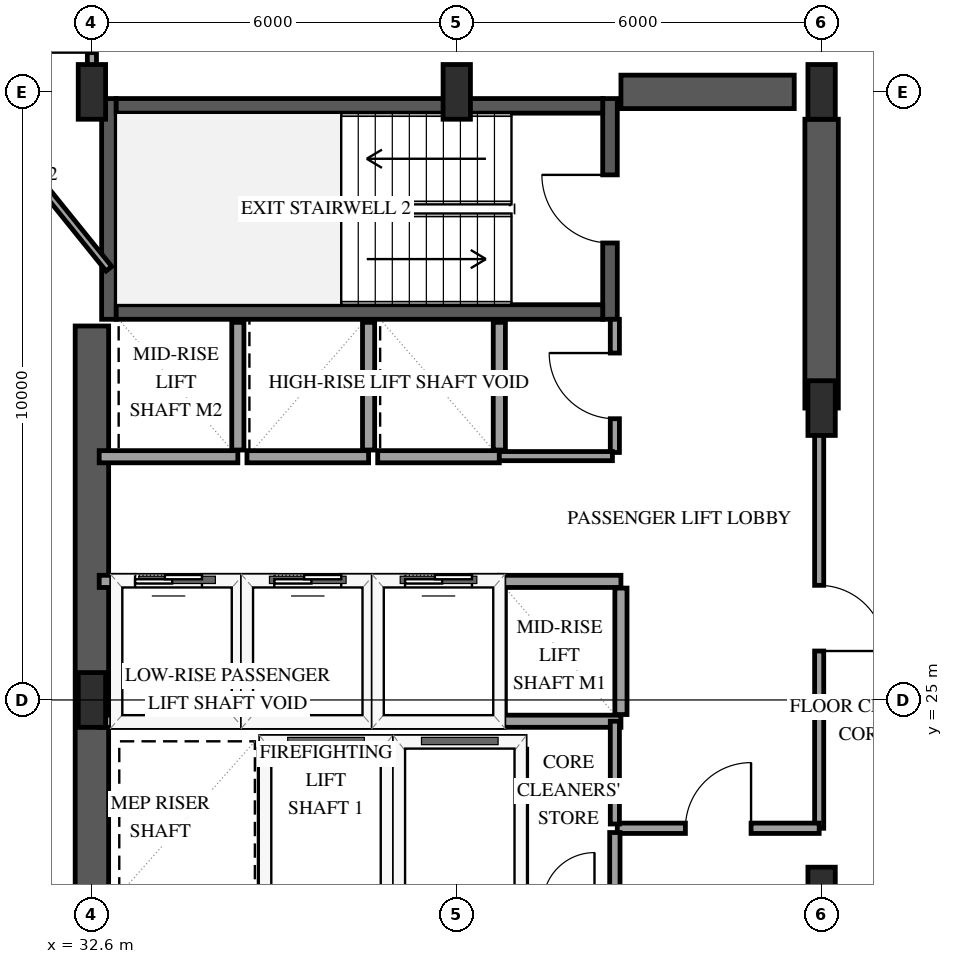
"""IFC4 building model, lengths in metres.
Left out: names, types, materials, properties, quantities, classifications, styles, units other than length and angle.
Written with IfcOpenShell. Run it as: python <this file> out.ifc"""

import sys

from ifc_helpers import new_model, si_unit, direction, frame, frame_2d, origin, origin_2d, place, context, subcontext, project, spatial, rectangle, extrude, element, fill, save


model = new_model("IFC4")
c1 = context("Model", 3, precision=1e-05, world=origin(), true_north=direction((0.0, 1.0)))
c2 = subcontext(c1, "Body", "Model", "MODEL_VIEW")
j1 = project(units=[si_unit("LENGTHUNIT", "METRE"), si_unit("PLANEANGLEUNIT", "RADIAN")], contexts=[c1])
p1 = place(None, origin())
s1 = spatial("IfcSite", under=j1, at=p1, CompositionType="ELEMENT")
p2 = place(p1, origin())
s2 = spatial("IfcBuilding", under=s1, at=p2, CompositionType="ELEMENT")
p3 = place(p2, frame((0.0, 0.0, 126.4)))
s3 = spatial("IfcBuildingStorey", under=s2, at=p3, CompositionType="ELEMENT", Elevation=126.4)
p4 = place(p3, frame((32.88, 31.26, 0.0), z_axis=(0.0, 0.0, 1.0), x_axis=(0.0, 1.0, 0.0)))
e1 = element("IfcWall", 1, at=p4, inside=s3, PredefinedType="SHEAR", context=c2, shape_type="SweptSolid", body=[
    extrude(rectangle(XDim=3.63, YDim=0.24, at=frame_2d((1.815, 0.0))), origin(), (0.0, 0.0, 1.0), 3.9),
])
p5 = place(p3, frame((41.12, 31.26, 0.0), z_axis=(0.0, 0.0, 1.0), x_axis=(0.0, 1.0, 0.0)))
e2 = element("IfcWall", 2, at=p5, inside=s3, PredefinedType="SHEAR", context=c2, shape_type="SweptSolid", body=[
    extrude(rectangle(XDim=3.63, YDim=0.24, at=frame_2d((1.815, 0.0))), origin(), (0.0, 0.0, 1.0), 3.9),
])
p6 = place(p5, frame((1.255, 0.0, 0.0)))
e3 = element("IfcOpeningElement", 3, at=p6, cuts=e2, PredefinedType="OPENING", context=c2, shape_type="SweptSolid", body=[
    extrude(rectangle(XDim=1.12, YDim=2.15, at=frame_2d((0.56, 1.075))), frame((0.0, 0.13, 0.0), z_axis=(0.0, -1.0, 0.0), x_axis=(1.0, 0.0, 0.0)), (0.0, 0.0, 1.0), 0.26),
])
for number, where, z_axis, x_axis in (
    (4, (33.0, 31.38, 0.0), (0.0, 0.0, 1.0), (1.0, 0.0, 0.0)),
    (5, (33.0, 34.77, 0.0), (0.0, 0.0, 1.0), (1.0, 0.0, 0.0)),
):
    element("IfcWall", number, at=place(p3, frame(where, z_axis=z_axis, x_axis=x_axis)), inside=s3, PredefinedType="SHEAR", context=c2, shape_type="SweptSolid", body=[
        extrude(rectangle(XDim=8.0, YDim=0.24, at=frame_2d((4.0, 0.0))), origin(), (0.0, 0.0, 1.0), 3.9),
    ])
p7 = place(p3, frame((32.6, 18.85, 0.0), z_axis=(0.0, 0.0, 1.0), x_axis=(0.0, 1.0, 0.0)))
e6 = element("IfcWall", 6, at=p7, inside=s3, PredefinedType="SHEAR", context=c2, shape_type="SweptSolid", body=[
    extrude(rectangle(XDim=12.3, YDim=0.55, at=frame_2d((6.15, 0.0))), origin(), (0.0, 0.0, 1.0), 3.9),
])
p8 = place(p3, frame((41.3, 35.0, 0.0), z_axis=(0.0, 0.0, 1.0), x_axis=(1.0, 0.0, 0.0)))
e7 = element("IfcWall", 7, at=p8, inside=s3, PredefinedType="SHEAR", context=c2, shape_type="SweptSolid", body=[
    extrude(rectangle(XDim=2.85, YDim=0.55, at=frame_2d((1.425, 0.0))), origin(), (0.0, 0.0, 1.0), 3.9),
])
p9 = place(p3, frame((44.6, 29.8, 0.0), z_axis=(0.0, 0.0, 1.0), x_axis=(0.0, 1.0, 0.0)))
e8 = element("IfcWall", 8, at=p9, inside=s3, PredefinedType="SHEAR", context=c2, shape_type="SweptSolid", body=[
    extrude(rectangle(XDim=4.75, YDim=0.55, at=frame_2d((2.375, 0.0))), origin(), (0.0, 0.0, 1.0), 3.9),
])
for number, where, z_axis, x_axis in (
    (9, (32.6, 25.0, 0.0), (0.0, 0.0, 1.0), (1.0, 0.0, 0.0)),
    (10, (32.6, 35.0, 0.0), (0.0, 0.0, 1.0), (1.0, 0.0, 0.0)),
    (11, (38.6, 35.0, 0.0), (0.0, 0.0, 1.0), (1.0, 0.0, 0.0)),
    (12, (44.6, 21.8, 0.0), (0.0, 0.0, 1.0), (1.0, 0.0, 0.0)),
    (13, (44.6, 29.8, 0.0), (0.0, 0.0, 1.0), (1.0, 0.0, 0.0)),
    (14, (44.6, 35.0, 0.0), (0.0, 0.0, 1.0), (1.0, 0.0, 0.0)),
):
    element("IfcColumn", number, at=place(p3, frame(where, z_axis=z_axis, x_axis=x_axis)), inside=s3, PredefinedType="PILASTER", context=c2, shape_type="SweptSolid", body=[
        extrude(rectangle(XDim=0.45, YDim=0.9, at=origin_2d()), origin(), (0.0, 0.0, 1.0), 3.9),
    ])
p10 = place(p3, frame((35.45, 24.3, 0.0), z_axis=(0.0, 0.0, 1.0), x_axis=(1.0, 0.0, 0.0)))
e15 = element("IfcWall", 15, at=p10, inside=s3, PredefinedType="SOLIDWALL", context=c2, shape_type="SweptSolid", body=[
    extrude(rectangle(XDim=2.0, YDim=0.2, at=frame_2d((1.0, 0.0))), origin(), (0.0, 0.0, 1.0), 3.6),
])
for number, where, z_axis, x_axis in (
    (16, (35.45, 21.81, 0.0), (0.0, 0.0, 1.0), (0.0, 1.0, 0.0)),
    (17, (37.45, 21.81, 0.0), (0.0, 0.0, 1.0), (0.0, 1.0, 0.0)),
):
    element("IfcWall", number, at=place(p3, frame(where, z_axis=z_axis, x_axis=x_axis)), inside=s3, PredefinedType="SOLIDWALL", context=c2, shape_type="SweptSolid", body=[
        extrude(rectangle(XDim=2.38, YDim=0.2, at=frame_2d((1.19, 0.0))), origin(), (0.0, 0.0, 1.0), 3.6),
    ])
p11 = place(p3, frame((37.65, 24.3, 0.0), z_axis=(0.0, 0.0, 1.0), x_axis=(1.0, 0.0, 0.0)))
e18 = element("IfcWall", 18, at=p11, inside=s3, PredefinedType="SOLIDWALL", context=c2, shape_type="SweptSolid", body=[
    extrude(rectangle(XDim=2.0, YDim=0.2, at=frame_2d((1.0, 0.0))), origin(), (0.0, 0.0, 1.0), 3.6),
])
p12 = place(p3, frame((39.65, 21.81, 0.0), z_axis=(0.0, 0.0, 1.0), x_axis=(0.0, 1.0, 0.0)))
e19 = element("IfcWall", 19, at=p12, inside=s3, PredefinedType="SOLIDWALL", context=c2, shape_type="SweptSolid", body=[
    extrude(rectangle(XDim=2.38, YDim=0.2, at=frame_2d((1.19, 0.0))), origin(), (0.0, 0.0, 1.0), 3.6),
])
p13 = place(p3, frame((32.72, 24.65, 0.0), z_axis=(0.0, 0.0, 1.0), x_axis=(1.0, 0.0, 0.0)))
e20 = element("IfcWall", 20, at=p13, inside=s3, PredefinedType="SOLIDWALL", context=c2, shape_type="SweptSolid", body=[
    extrude(rectangle(XDim=2.28, YDim=0.2, at=frame_2d((1.14, 0.0))), origin(), (0.0, 0.0, 1.0), 3.6),
])
p14 = place(p3, frame((32.72, 26.95, 0.0), z_axis=(0.0, 0.0, 1.0), x_axis=(1.0, 0.0, 0.0)))
e21 = element("IfcWall", 21, at=p14, inside=s3, PredefinedType="SOLIDWALL", context=c2, shape_type="SweptSolid", body=[
    extrude(rectangle(XDim=2.28, YDim=0.2, at=frame_2d((1.14, 0.0))), origin(), (0.0, 0.0, 1.0), 3.6),
])
p15 = place(p14, frame((0.59, 0.0, 0.0)))
e22 = element("IfcOpeningElement", 22, at=p15, cuts=e21, PredefinedType="OPENING", context=c2, shape_type="SweptSolid", body=[
    extrude(rectangle(XDim=1.1, YDim=2.15, at=frame_2d((0.55, 1.075))), frame((0.0, 0.11, 0.0), z_axis=(0.0, -1.0, 0.0), x_axis=(1.0, 0.0, 0.0)), (0.0, 0.0, 1.0), 0.22),
])
p16 = place(p3, frame((35.0, 24.76, 0.0), z_axis=(0.0, 0.0, 1.0), x_axis=(0.0, 1.0, 0.0)))
e23 = element("IfcWall", 23, at=p16, inside=s3, PredefinedType="SOLIDWALL", context=c2, shape_type="SweptSolid", body=[
    extrude(rectangle(XDim=2.08, YDim=0.2, at=frame_2d((1.04, 0.0))), origin(), (0.0, 0.0, 1.0), 3.6),
])
p17 = place(p3, frame((35.15, 24.65, 0.0), z_axis=(0.0, 0.0, 1.0), x_axis=(1.0, 0.0, 0.0)))
e24 = element("IfcWall", 24, at=p17, inside=s3, PredefinedType="SOLIDWALL", context=c2, shape_type="SweptSolid", body=[
    extrude(rectangle(XDim=2.0, YDim=0.2, at=frame_2d((1.0, 0.0))), origin(), (0.0, 0.0, 1.0), 3.6),
])
p18 = place(p3, frame((35.15, 26.95, 0.0), z_axis=(0.0, 0.0, 1.0), x_axis=(1.0, 0.0, 0.0)))
e25 = element("IfcWall", 25, at=p18, inside=s3, PredefinedType="SOLIDWALL", context=c2, shape_type="SweptSolid", body=[
    extrude(rectangle(XDim=2.0, YDim=0.2, at=frame_2d((1.0, 0.0))), origin(), (0.0, 0.0, 1.0), 3.6),
])
p19 = place(p18, frame((0.45, 0.0, 0.0)))
e26 = element("IfcOpeningElement", 26, at=p19, cuts=e25, PredefinedType="OPENING", context=c2, shape_type="SweptSolid", body=[
    extrude(rectangle(XDim=1.1, YDim=2.15, at=frame_2d((0.55, 1.075))), frame((0.0, 0.11, 0.0), z_axis=(0.0, -1.0, 0.0), x_axis=(1.0, 0.0, 0.0)), (0.0, 0.0, 1.0), 0.22),
])
p20 = place(p3, frame((37.15, 24.76, 0.0), z_axis=(0.0, 0.0, 1.0), x_axis=(0.0, 1.0, 0.0)))
e27 = element("IfcWall", 27, at=p20, inside=s3, PredefinedType="SOLIDWALL", context=c2, shape_type="SweptSolid", body=[
    extrude(rectangle(XDim=2.08, YDim=0.2, at=frame_2d((1.04, 0.0))), origin(), (0.0, 0.0, 1.0), 3.6),
])
p21 = place(p3, frame((37.3, 24.65, 0.0), z_axis=(0.0, 0.0, 1.0), x_axis=(1.0, 0.0, 0.0)))
e28 = element("IfcWall", 28, at=p21, inside=s3, PredefinedType="SOLIDWALL", context=c2, shape_type="SweptSolid", body=[
    extrude(rectangle(XDim=2.0, YDim=0.2, at=frame_2d((1.0, 0.0))), origin(), (0.0, 0.0, 1.0), 3.6),
])
p22 = place(p3, frame((37.3, 26.95, 0.0), z_axis=(0.0, 0.0, 1.0), x_axis=(1.0, 0.0, 0.0)))
e29 = element("IfcWall", 29, at=p22, inside=s3, PredefinedType="SOLIDWALL", context=c2, shape_type="SweptSolid", body=[
    extrude(rectangle(XDim=2.0, YDim=0.2, at=frame_2d((1.0, 0.0))), origin(), (0.0, 0.0, 1.0), 3.6),
])
p23 = place(p22, frame((0.45, 0.0, 0.0)))
e30 = element("IfcOpeningElement", 30, at=p23, cuts=e29, PredefinedType="OPENING", context=c2, shape_type="SweptSolid", body=[
    extrude(rectangle(XDim=1.1, YDim=2.15, at=frame_2d((0.55, 1.075))), frame((0.0, 0.11, 0.0), z_axis=(0.0, -1.0, 0.0), x_axis=(1.0, 0.0, 0.0)), (0.0, 0.0, 1.0), 0.22),
])
p24 = place(p3, frame((39.3, 24.76, 0.0), z_axis=(0.0, 0.0, 1.0), x_axis=(0.0, 1.0, 0.0)))
e31 = element("IfcWall", 31, at=p24, inside=s3, PredefinedType="SOLIDWALL", context=c2, shape_type="SweptSolid", body=[
    extrude(rectangle(XDim=2.08, YDim=0.2, at=frame_2d((1.04, 0.0))), origin(), (0.0, 0.0, 1.0), 3.6),
])
for number, where, z_axis, x_axis in (
    (32, (39.3, 24.65, 0.0), (0.0, 0.0, 1.0), (1.0, 0.0, 0.0)),
    (33, (39.3, 26.95, 0.0), (0.0, 0.0, 1.0), (1.0, 0.0, 0.0)),
):
    element("IfcWall", number, at=place(p3, frame(where, z_axis=z_axis, x_axis=x_axis)), inside=s3, PredefinedType="SOLIDWALL", context=c2, shape_type="SweptSolid", body=[
        extrude(rectangle(XDim=2.0, YDim=0.2, at=frame_2d((1.0, 0.0))), origin(), (0.0, 0.0, 1.0), 3.6),
    ])
p25 = place(p3, frame((41.3, 24.76, 0.0), z_axis=(0.0, 0.0, 1.0), x_axis=(0.0, 1.0, 0.0)))
e34 = element("IfcWall", 34, at=p25, inside=s3, PredefinedType="SOLIDWALL", context=c2, shape_type="SweptSolid", body=[
    extrude(rectangle(XDim=2.08, YDim=0.2, at=frame_2d((1.04, 0.0))), origin(), (0.0, 0.0, 1.0), 3.6),
])
p26 = place(p3, frame((32.72, 29.0, 0.0), z_axis=(0.0, 0.0, 1.0), x_axis=(1.0, 0.0, 0.0)))
e35 = element("IfcWall", 35, at=p26, inside=s3, PredefinedType="SOLIDWALL", context=c2, shape_type="SweptSolid", body=[
    extrude(rectangle(XDim=2.28, YDim=0.2, at=frame_2d((1.14, 0.0))), origin(), (0.0, 0.0, 1.0), 3.6),
])
p27 = place(p3, frame((35.0, 29.11, 0.0), z_axis=(0.0, 0.0, 1.0), x_axis=(0.0, 1.0, 0.0)))
e36 = element("IfcWall", 36, at=p27, inside=s3, PredefinedType="SOLIDWALL", context=c2, shape_type="SweptSolid", body=[
    extrude(rectangle(XDim=2.1, YDim=0.2, at=frame_2d((1.05, 0.0))), origin(), (0.0, 0.0, 1.0), 3.6),
])
p28 = place(p3, frame((35.15, 29.0, 0.0), z_axis=(0.0, 0.0, 1.0), x_axis=(1.0, 0.0, 0.0)))
e37 = element("IfcWall", 37, at=p28, inside=s3, PredefinedType="SOLIDWALL", context=c2, shape_type="SweptSolid", body=[
    extrude(rectangle(XDim=2.0, YDim=0.2, at=frame_2d((1.0, 0.0))), origin(), (0.0, 0.0, 1.0), 3.6),
])
p29 = place(p3, frame((37.15, 29.11, 0.0), z_axis=(0.0, 0.0, 1.0), x_axis=(0.0, 1.0, 0.0)))
e38 = element("IfcWall", 38, at=p29, inside=s3, PredefinedType="SOLIDWALL", context=c2, shape_type="SweptSolid", body=[
    extrude(rectangle(XDim=2.1, YDim=0.2, at=frame_2d((1.05, 0.0))), origin(), (0.0, 0.0, 1.0), 3.6),
])
p30 = place(p3, frame((37.3, 29.0, 0.0), z_axis=(0.0, 0.0, 1.0), x_axis=(1.0, 0.0, 0.0)))
e39 = element("IfcWall", 39, at=p30, inside=s3, PredefinedType="SOLIDWALL", context=c2, shape_type="SweptSolid", body=[
    extrude(rectangle(XDim=2.0, YDim=0.2, at=frame_2d((1.0, 0.0))), origin(), (0.0, 0.0, 1.0), 3.6),
])
p31 = place(p3, frame((39.3, 29.11, 0.0), z_axis=(0.0, 0.0, 1.0), x_axis=(0.0, 1.0, 0.0)))
e40 = element("IfcWall", 40, at=p31, inside=s3, PredefinedType="SOLIDWALL", context=c2, shape_type="SweptSolid", body=[
    extrude(rectangle(XDim=2.1, YDim=0.2, at=frame_2d((1.05, 0.0))), origin(), (0.0, 0.0, 1.0), 3.6),
])
p32 = place(p3, frame((44.56, 29.8, 0.0), z_axis=(0.0, 0.0, 1.0), x_axis=(0.0, -1.0, 0.0)))
e41 = element("IfcWall", 41, at=p32, inside=s3, PredefinedType="PARTITIONING", context=c2, shape_type="SweptSolid", body=[
    extrude(rectangle(XDim=6.91, YDim=0.15, at=frame_2d((3.455, 0.0))), origin(), (0.0, 0.0, 1.0), 2.64),
])
p33 = place(p32, frame((2.915, 0.0, 0.0)))
e42 = element("IfcOpeningElement", 42, at=p33, cuts=e41, PredefinedType="OPENING", context=c2, shape_type="SweptSolid", body=[
    extrude(rectangle(XDim=1.08, YDim=2.15, at=frame_2d((0.54, 1.075))), frame((0.0, 0.085, 0.0), z_axis=(0.0, -1.0, 0.0), x_axis=(1.0, 0.0, 0.0)), (0.0, 0.0, 1.0), 0.17),
])
p34 = place(p3, frame((32.88, 32.091, 0.0), z_axis=(0.0, 0.0, 1.0), x_axis=(-0.627801721524, 0.778373302761, 0.0)))
e43 = element("IfcWall", 43, at=p34, inside=s3, PredefinedType="PARTITIONING", context=c2, shape_type="SweptSolid", body=[
    extrude(rectangle(XDim=3.971, YDim=0.12, at=frame_2d((1.985, 0.0))), origin(), (0.0, 0.0, 1.0), 3.6),
])
p35 = place(p3, frame((41.24, 22.89, 0.0), z_axis=(0.0, 0.0, 1.0), x_axis=(1.0, 0.0, 0.0)))
e44 = element("IfcWall", 44, at=p35, inside=s3, PredefinedType="PARTITIONING", context=c2, shape_type="SweptSolid", body=[
    extrude(rectangle(XDim=3.32, YDim=0.17, at=frame_2d((1.66, 0.0))), origin(), (0.0, 0.0, 1.0), 3.6),
])
p36 = place(p35, frame((1.12, 0.0, 0.0)))
e45 = element("IfcOpeningElement", 45, at=p36, cuts=e44, PredefinedType="OPENING", context=c2, shape_type="SweptSolid", body=[
    extrude(rectangle(XDim=1.08, YDim=2.15, at=frame_2d((0.54, 1.075))), frame((0.0, 0.095, 0.0), z_axis=(0.0, -1.0, 0.0), x_axis=(1.0, 0.0, 0.0)), (0.0, 0.0, 1.0), 0.19),
])
p37 = place(p3, frame((41.2, 29.07, 0.0), z_axis=(0.0, 0.0, 1.0), x_axis=(0.0, 1.0, 0.0)))
e46 = element("IfcWall", 46, at=p37, inside=s3, PredefinedType="PARTITIONING", context=c2, shape_type="SweptSolid", body=[
    extrude(rectangle(XDim=2.19, YDim=0.15, at=frame_2d((1.095, 0.0))), origin(), (0.0, 0.0, 1.0), 3.6),
])
p38 = place(p37, frame((0.555, 0.0, 0.0)))
e47 = element("IfcOpeningElement", 47, at=p38, cuts=e46, PredefinedType="OPENING", context=c2, shape_type="SweptSolid", body=[
    extrude(rectangle(XDim=1.08, YDim=2.15, at=frame_2d((0.54, 1.075))), frame((0.0, 0.085, 0.0), z_axis=(0.0, -1.0, 0.0), x_axis=(1.0, 0.0, 0.0)), (0.0, 0.0, 1.0), 0.17),
])
p39 = place(p3, frame((32.6, 35.07, 0.0), z_axis=(0.0, 0.0, 1.0), x_axis=(0.0, 1.0, 0.0)))
e48 = element("IfcWall", 48, at=p39, inside=s3, PredefinedType="PARTITIONING", context=c2, shape_type="SweptSolid", body=[
    extrude(rectangle(XDim=1.91, YDim=0.15, at=frame_2d((0.955, 0.0))), origin(), (0.0, 0.0, 1.0), 3.6),
])
p40 = place(p39, frame((0.575, 0.0, 0.0)))
e49 = element("IfcOpeningElement", 49, at=p40, cuts=e48, PredefinedType="OPENING", context=c2, shape_type="SweptSolid", body=[
    extrude(rectangle(XDim=0.92, YDim=2.12, at=frame_2d((0.46, 1.06))), frame((0.0, 0.085, 0.0), z_axis=(0.0, -1.0, 0.0), x_axis=(1.0, 0.0, 0.0)), (0.0, 0.0, 1.0), 0.17),
])
p41 = place(p3, frame((39.3, 29.01, 0.0), z_axis=(0.0, 0.0, 1.0), x_axis=(1.0, 0.0, 0.0)))
e50 = element("IfcWall", 50, at=p41, inside=s3, PredefinedType="PARTITIONING", context=c2, shape_type="SweptSolid", body=[
    extrude(rectangle(XDim=1.86, YDim=0.15, at=frame_2d((0.93, 0.0))), origin(), (0.0, 0.0, 1.0), 3.6),
])
p42 = place(p3, frame((41.2, 22.96, 0.0), z_axis=(0.0, 0.0, 1.0), x_axis=(0.0, 1.0, 0.0)))
e51 = element("IfcWall", 51, at=p42, inside=s3, PredefinedType="PARTITIONING", context=c2, shape_type="SweptSolid", body=[
    extrude(rectangle(XDim=1.69, YDim=0.15, at=frame_2d((0.845, 0.0))), origin(), (0.0, 0.0, 1.0), 3.6),
])
p43 = place(p3, frame((41.2, 21.7, 0.0), z_axis=(0.0, 0.0, 1.0), x_axis=(0.0, 1.0, 0.0)))
e52 = element("IfcWall", 52, at=p43, inside=s3, PredefinedType="PARTITIONING", context=c2, shape_type="SweptSolid", body=[
    extrude(rectangle(XDim=1.12, YDim=0.17, at=frame_2d((0.56, 0.0))), origin(), (0.0, 0.0, 1.0), 3.6),
])
p44 = place(p15, origin())
e53 = element("IfcDoor", 53, at=p44, inside=s3, OperationType="SLIDING_TO_LEFT", PredefinedType="DOOR", context=c2, shape_type="SweptSolid", body=[
    extrude(rectangle(XDim=1.1, YDim=2.15, at=frame_2d((0.55, 1.075))), frame((0.0, 0.025, 0.0), z_axis=(0.0, -1.0, 0.0), x_axis=(1.0, 0.0, 0.0)), (0.0, 0.0, 1.0), 0.05),
])
fill(e22, e53)
p45 = place(p19, origin())
e54 = element("IfcDoor", 54, at=p45, inside=s3, OperationType="SLIDING_TO_LEFT", PredefinedType="DOOR", context=c2, shape_type="SweptSolid", body=[
    extrude(rectangle(XDim=1.1, YDim=2.15, at=frame_2d((0.55, 1.075))), frame((0.0, 0.025, 0.0), z_axis=(0.0, -1.0, 0.0), x_axis=(1.0, 0.0, 0.0)), (0.0, 0.0, 1.0), 0.05),
])
fill(e26, e54)
p46 = place(p23, origin())
e55 = element("IfcDoor", 55, at=p46, inside=s3, OperationType="SLIDING_TO_LEFT", PredefinedType="DOOR", context=c2, shape_type="SweptSolid", body=[
    extrude(rectangle(XDim=1.1, YDim=2.15, at=frame_2d((0.55, 1.075))), frame((0.0, 0.025, 0.0), z_axis=(0.0, -1.0, 0.0), x_axis=(1.0, 0.0, 0.0)), (0.0, 0.0, 1.0), 0.05),
])
fill(e30, e55)
p47 = place(p6, origin())
e56 = element("IfcDoor", 56, at=p47, inside=s3, OperationType="SINGLE_SWING_RIGHT", PredefinedType="DOOR", context=c2, shape_type="SweptSolid", body=[
    extrude(rectangle(XDim=1.12, YDim=2.15, at=frame_2d((0.56, 1.075))), frame((0.0, 0.025, 0.0), z_axis=(0.0, -1.0, 0.0), x_axis=(1.0, 0.0, 0.0)), (0.0, 0.0, 1.0), 0.05),
])
fill(e3, e56)
p48 = place(p33, origin())
e57 = element("IfcDoor", 57, at=p48, inside=s3, OperationType="SINGLE_SWING_RIGHT", PredefinedType="DOOR", context=c2, shape_type="SweptSolid", body=[
    extrude(rectangle(XDim=1.08, YDim=2.15, at=frame_2d((0.54, 1.075))), frame((0.0, 0.025, 0.0), z_axis=(0.0, -1.0, 0.0), x_axis=(1.0, 0.0, 0.0)), (0.0, 0.0, 1.0), 0.05),
])
fill(e42, e57)
p49 = place(p36, origin())
e58 = element("IfcDoor", 58, at=p49, inside=s3, OperationType="SINGLE_SWING_RIGHT", PredefinedType="DOOR", context=c2, shape_type="SweptSolid", body=[
    extrude(rectangle(XDim=1.08, YDim=2.15, at=frame_2d((0.54, 1.075))), frame((0.0, 0.025, 0.0), z_axis=(0.0, -1.0, 0.0), x_axis=(1.0, 0.0, 0.0)), (0.0, 0.0, 1.0), 0.05),
])
fill(e45, e58)
p50 = place(p38, origin())
e59 = element("IfcDoor", 59, at=p50, inside=s3, OperationType="SINGLE_SWING_RIGHT", PredefinedType="DOOR", context=c2, shape_type="SweptSolid", body=[
    extrude(rectangle(XDim=1.08, YDim=2.15, at=frame_2d((0.54, 1.075))), frame((0.0, 0.025, 0.0), z_axis=(0.0, -1.0, 0.0), x_axis=(1.0, 0.0, 0.0)), (0.0, 0.0, 1.0), 0.05),
])
fill(e47, e59)
p51 = place(p40, origin())
e60 = element("IfcDoor", 60, at=p51, inside=s3, OperationType="SINGLE_SWING_LEFT", PredefinedType="DOOR", context=c2, shape_type="SweptSolid", body=[
    extrude(rectangle(XDim=0.92, YDim=2.12, at=frame_2d((0.46, 1.06))), frame((0.0, 0.025, 0.0), z_axis=(0.0, -1.0, 0.0), x_axis=(1.0, 0.0, 0.0)), (0.0, 0.0, 1.0), 0.05),
])
fill(e49, e60)
save(model, sys.argv[1])
